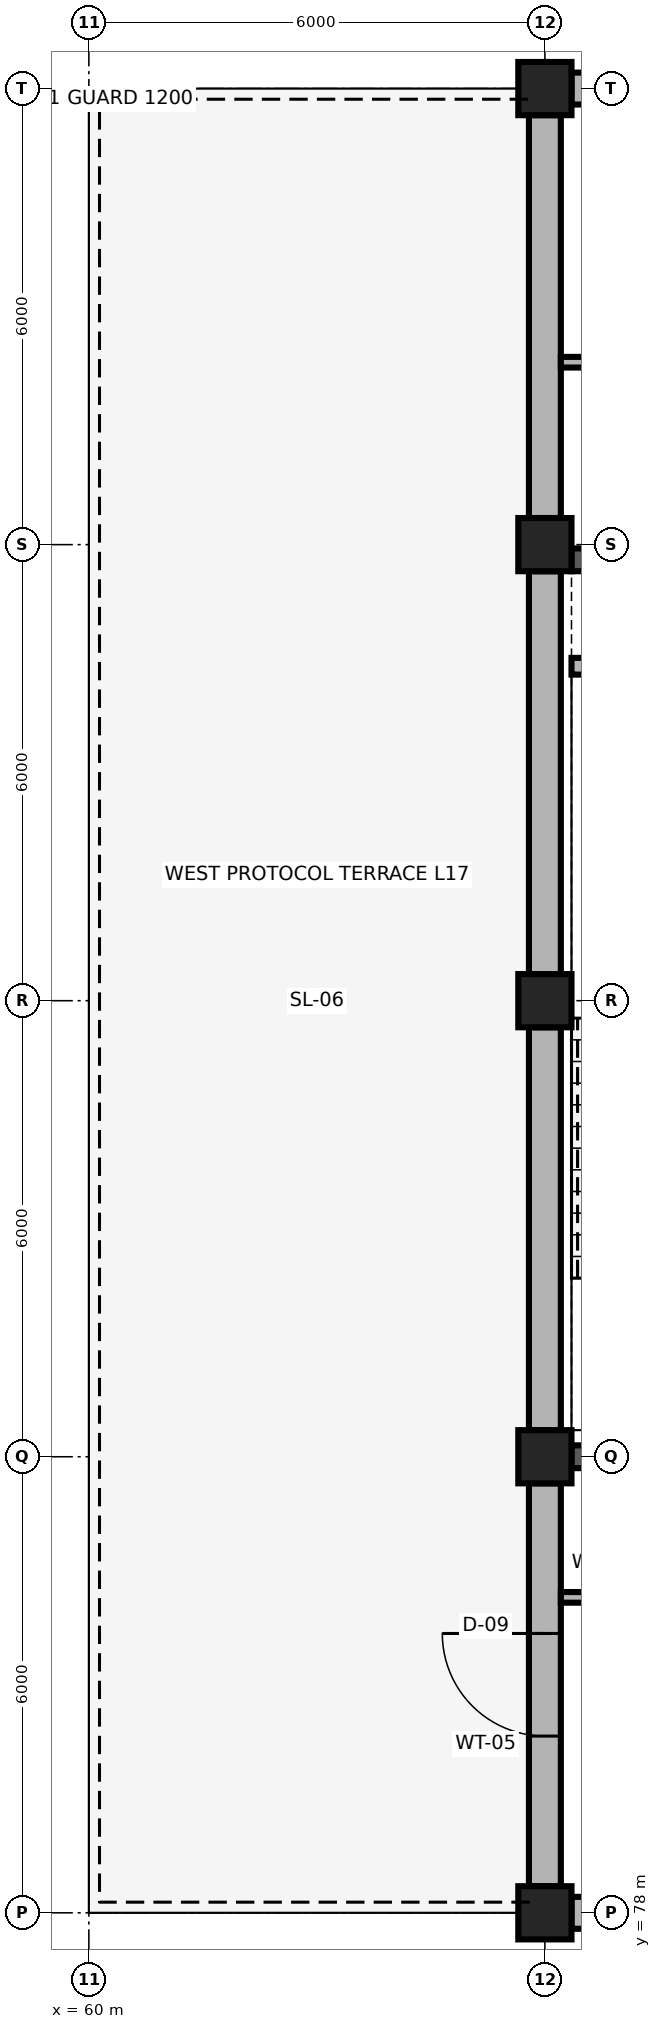
"""IFC4 building model, lengths in metres.
Left out: names, types, materials, properties, quantities, classifications, styles, units other than length and angle.
Written with IfcOpenShell. Run it as: python <this file> out.ifc"""

import sys

from ifc_helpers import new_model, si_unit, direction, frame, frame_2d, origin, origin_2d, place, context, subcontext, project, spatial, rectangle, extrude, element, fill, save


model = new_model("IFC4")
c1 = context("Model", 3, precision=1e-05, world=origin(), true_north=direction((0.0, 1.0)))
c2 = subcontext(c1, "Body", "Model", "MODEL_VIEW")
j1 = project(units=[si_unit("LENGTHUNIT", "METRE"), si_unit("PLANEANGLEUNIT", "RADIAN")], contexts=[c1])
p1 = place(None, origin())
s1 = spatial("IfcSite", under=j1, at=p1, CompositionType="ELEMENT")
p2 = place(p1, origin())
s2 = spatial("IfcBuilding", under=s1, at=p2, CompositionType="ELEMENT")
p3 = place(p2, frame((0.0, 0.0, 67.8)))
s3 = spatial("IfcBuildingStorey", under=s2, at=p3, CompositionType="ELEMENT", Elevation=67.8)
for number, where, z_axis, x_axis in (
    (1, (66.0, 78.0, 0.0), (0.0, 0.0, 1.0), (1.0, 0.0, 0.0)),
    (2, (66.0, 84.0, 0.0), (0.0, 0.0, 1.0), (1.0, 0.0, 0.0)),
    (3, (66.0, 90.0, 0.0), (0.0, 0.0, 1.0), (1.0, 0.0, 0.0)),
    (4, (66.0, 96.0, 0.0), (0.0, 0.0, 1.0), (1.0, 0.0, 0.0)),
    (5, (66.0, 102.0, 0.0), (0.0, 0.0, 1.0), (1.0, 0.0, 0.0)),
):
    element("IfcColumn", number, at=place(p3, frame(where, z_axis=z_axis, x_axis=x_axis)), inside=s3, PredefinedType="COLUMN", context=c2, shape_type="SweptSolid", body=[
        extrude(rectangle(XDim=0.7, YDim=0.7, at=origin_2d()), origin(), (0.0, 0.0, 1.0), 4.2),
    ])
for number, where, z_axis, x_axis in (
    (6, (66.35, 78.0, 0.0), (0.0, 0.0, 1.0), (1.0, 0.0, 0.0)),
    (7, (66.35, 102.0, 0.0), (0.0, 0.0, 1.0), (1.0, 0.0, 0.0)),
):
    element("IfcWall", number, at=place(p3, frame(where, z_axis=z_axis, x_axis=x_axis)), inside=s3, PredefinedType="SOLIDWALL", context=c2, shape_type="SweptSolid", body=[
        extrude(rectangle(XDim=5.3, YDim=0.42, at=frame_2d((2.65, 0.0))), origin(), (0.0, 0.0, 1.0), 3.54),
    ])
p4 = place(p3, frame((66.0, 78.35, 0.0), z_axis=(0.0, 0.0, 1.0), x_axis=(0.0, 1.0, 0.0)))
e8 = element("IfcWall", 8, at=p4, inside=s3, PredefinedType="SOLIDWALL", context=c2, shape_type="SweptSolid", body=[
    extrude(rectangle(XDim=5.3, YDim=0.42, at=frame_2d((2.65, 0.0))), origin(), (0.0, 0.0, 1.0), 3.54),
])
p5 = place(p4, frame((1.975, 0.0, 0.0)))
e9 = element("IfcOpeningElement", 9, at=p5, cuts=e8, PredefinedType="OPENING", context=c2, shape_type="SweptSolid", body=[
    extrude(rectangle(XDim=1.35, YDim=2.35, at=frame_2d((0.675, 1.175))), frame((0.0, 0.225, 0.0), z_axis=(0.0, -1.0, 0.0), x_axis=(1.0, 0.0, 0.0)), (0.0, 0.0, 1.0), 0.45),
])
for number, where, z_axis, x_axis in (
    (10, (66.0, 84.35, 0.0), (0.0, 0.0, 1.0), (0.0, 1.0, 0.0)),
    (11, (66.0, 90.35, 0.0), (0.0, 0.0, 1.0), (0.0, 1.0, 0.0)),
    (12, (66.0, 96.35, 0.0), (0.0, 0.0, 1.0), (0.0, 1.0, 0.0)),
):
    element("IfcWall", number, at=place(p3, frame(where, z_axis=z_axis, x_axis=x_axis)), inside=s3, PredefinedType="SOLIDWALL", context=c2, shape_type="SweptSolid", body=[
        extrude(rectangle(XDim=5.3, YDim=0.42, at=frame_2d((2.65, 0.0))), origin(), (0.0, 0.0, 1.0), 3.54),
    ])
p6 = place(p3, frame((66.35, 84.0, 0.0), z_axis=(0.0, 0.0, 1.0), x_axis=(1.0, 0.0, 0.0)))
e13 = element("IfcWall", 13, at=p6, inside=s3, PredefinedType="SHEAR", context=c2, shape_type="SweptSolid", body=[
    extrude(rectangle(XDim=5.3, YDim=0.3, at=frame_2d((2.65, 0.0))), origin(), (0.0, 0.0, 1.0), 3.96),
])
p7 = place(p6, frame((1.975, 0.0, 0.0)))
e14 = element("IfcOpeningElement", 14, at=p7, cuts=e13, PredefinedType="OPENING", context=c2, shape_type="SweptSolid", body=[
    extrude(rectangle(XDim=1.35, YDim=2.2, at=frame_2d((0.675, 1.1))), frame((0.0, 0.165, 0.0), z_axis=(0.0, -1.0, 0.0), x_axis=(1.0, 0.0, 0.0)), (0.0, 0.0, 1.0), 0.33),
])
p8 = place(p3, frame((66.35, 95.8, 0.0), z_axis=(0.0, 0.0, 1.0), x_axis=(1.0, 0.0, 0.0)))
e15 = element("IfcWall", 15, at=p8, inside=s3, PredefinedType="SHEAR", context=c2, shape_type="SweptSolid", body=[
    extrude(rectangle(XDim=5.3, YDim=0.3, at=frame_2d((2.65, 0.0))), origin(), (0.0, 0.0, 1.0), 3.96),
])
p9 = place(p3, frame((66.35, 94.4, 0.0), z_axis=(0.0, 0.0, 1.0), x_axis=(1.0, 0.0, 0.0)))
e16 = element("IfcWall", 16, at=p9, inside=s3, PredefinedType="PARTITIONING", context=c2, shape_type="SweptSolid", body=[
    extrude(rectangle(XDim=1.1, YDim=0.22, at=frame_2d((0.55, 0.0))), origin(), (0.0, 0.0, 1.0), 3.96),
])
p10 = place(p3, frame((67.7, 82.15, 0.0), z_axis=(0.0, 0.0, 1.0), x_axis=(-1.0, 0.0, 0.0)))
e17 = element("IfcWall", 17, at=p10, inside=s3, PredefinedType="PARTITIONING", context=c2, shape_type="SweptSolid", body=[
    extrude(rectangle(XDim=1.49, YDim=0.14, at=frame_2d((0.745, 0.0))), origin(), (0.0, 0.0, 1.0), 3.96),
])
p11 = place(p3, frame((66.21, 98.4, 0.0), z_axis=(0.0, 0.0, 1.0), x_axis=(1.0, 0.0, 0.0)))
e18 = element("IfcWall", 18, at=p11, inside=s3, PredefinedType="PARTITIONING", context=c2, shape_type="SweptSolid", body=[
    extrude(rectangle(XDim=5.79, YDim=0.14, at=frame_2d((2.895, 0.0))), origin(), (0.0, 0.0, 1.0), 3.96),
])
p12 = place(p5, origin())
e19 = element("IfcDoor", 19, at=p12, inside=s3, OperationType="SINGLE_SWING_RIGHT", PredefinedType="DOOR", context=c2, shape_type="SweptSolid", body=[
    extrude(rectangle(XDim=1.35, YDim=2.35, at=frame_2d((0.675, 1.175))), frame((0.0, 0.025, 0.0), z_axis=(0.0, -1.0, 0.0), x_axis=(1.0, 0.0, 0.0)), (0.0, 0.0, 1.0), 0.05),
])
fill(e9, e19)
save(model, sys.argv[1])
